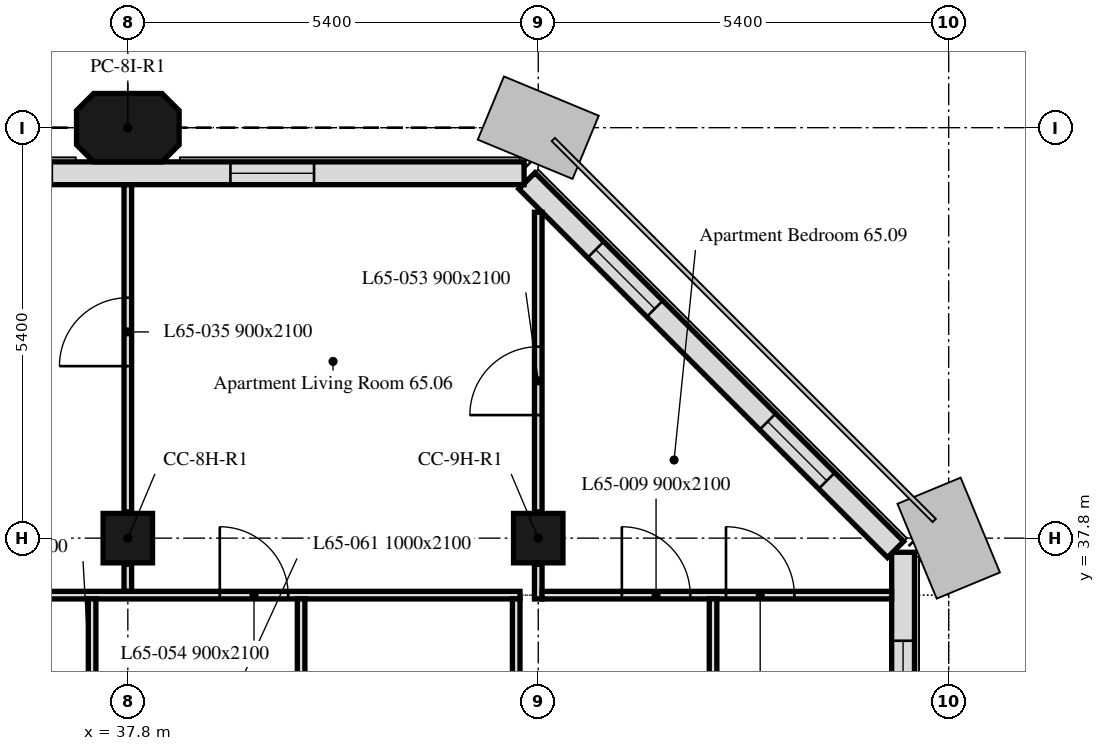
"""IFC4 building model, lengths in metres.
Left out: names, types, materials, properties, quantities, classifications, styles, units other than length and angle.
Written with IfcOpenShell. Run it as: python <this file> out.ifc"""

import sys

from ifc_helpers import new_model, si_unit, direction, frame, frame_2d, origin, origin_2d, place, context, subcontext, project, spatial, polyline, rectangle, outline, extrude, element, fill, save


model = new_model("IFC4")
c1 = context("Model", 3, precision=1e-05, world=origin(), true_north=direction((0.0, 1.0)))
c2 = subcontext(c1, "Body", "Model", "MODEL_VIEW")
j1 = project(units=[si_unit("LENGTHUNIT", "METRE"), si_unit("PLANEANGLEUNIT", "RADIAN")], contexts=[c1])
p1 = place(None, origin())
s1 = spatial("IfcSite", under=j1, at=p1, CompositionType="ELEMENT")
p2 = place(p1, origin())
s2 = spatial("IfcBuilding", under=s1, at=p2, CompositionType="ELEMENT")
p3 = place(p2, frame((0.0, 0.0, 268.6)))
s3 = spatial("IfcBuildingStorey", under=s2, at=p3, CompositionType="ELEMENT", Elevation=268.6)
for number, where, z_axis, x_axis in (
    (1, (37.8, 37.8, 0.0), (0.0, 0.0, 1.0), (1.0, 0.0, 0.0)),
    (2, (43.2, 37.8, 0.0), (0.0, 0.0, 1.0), (1.0, 0.0, 0.0)),
):
    element("IfcColumn", number, at=place(p3, frame(where, z_axis=z_axis, x_axis=x_axis)), inside=s3, PredefinedType="COLUMN", context=c2, shape_type="SweptSolid", body=[
        extrude(rectangle(XDim=0.65, YDim=0.65, at=origin_2d()), origin(), (0.0, 0.0, 1.0), 3.0),
    ])
p4 = place(p3, frame((37.8, 43.2, 0.0), z_axis=(0.0, 0.0, 1.0), x_axis=(1.0, 0.0, 0.0)))
e3 = element("IfcColumn", 3, at=p4, inside=s3, PredefinedType="COLUMN", context=c2, shape_type="SweptSolid", body=[
    extrude(outline(polyline([(-0.45, -0.45), (0.45, -0.45), (0.675, -0.225), (0.675, 0.225), (0.45, 0.45), (-0.45, 0.45), (-0.675, 0.225), (-0.675, -0.225), (-0.45, -0.45)])), origin(), (0.0, 0.0, 1.0), 3.0),
])
p5 = place(p3, frame((48.0, 5.586, 0.0), z_axis=(0.0, 0.0, 1.0), x_axis=(0.0, 1.0, 0.0)))
e4 = element("IfcWall", 4, at=p5, inside=s3, PredefinedType="SOLIDWALL", context=c2, shape_type="SweptSolid", body=[
    extrude(rectangle(XDim=32.027, YDim=0.3, at=frame_2d((16.014, 0.0))), origin(), (0.0, 0.0, 1.0), 3.0),
])
p6 = place(p5, frame((1.314, 0.0, 0.9)))
e5 = element("IfcOpeningElement", 5, at=p6, cuts=e4, PredefinedType="OPENING", context=c2, shape_type="SweptSolid", body=[
    extrude(rectangle(XDim=1.1, YDim=1.7, at=frame_2d((0.55, 0.85))), frame((0.0, 0.16, 0.0), z_axis=(0.0, -1.0, 0.0), x_axis=(1.0, 0.0, 0.0)), (0.0, 0.0, 1.0), 0.32),
])
p7 = place(p5, frame((2.764, 0.0, 0.9)))
e6 = element("IfcOpeningElement", 6, at=p7, cuts=e4, PredefinedType="OPENING", context=c2, shape_type="SweptSolid", body=[
    extrude(rectangle(XDim=1.1, YDim=1.7, at=frame_2d((0.55, 0.85))), frame((0.0, 0.16, 0.0), z_axis=(0.0, -1.0, 0.0), x_axis=(1.0, 0.0, 0.0)), (0.0, 0.0, 1.0), 0.32),
])
p8 = place(p5, frame((6.564, 0.0, 0.9)))
e7 = element("IfcOpeningElement", 7, at=p8, cuts=e4, PredefinedType="OPENING", context=c2, shape_type="SweptSolid", body=[
    extrude(rectangle(XDim=1.1, YDim=1.7, at=frame_2d((0.55, 0.85))), frame((0.0, 0.16, 0.0), z_axis=(0.0, -1.0, 0.0), x_axis=(1.0, 0.0, 0.0)), (0.0, 0.0, 1.0), 0.32),
])
p9 = place(p5, frame((8.514, 0.0, 0.9)))
e8 = element("IfcOpeningElement", 8, at=p9, cuts=e4, PredefinedType="OPENING", context=c2, shape_type="SweptSolid", body=[
    extrude(rectangle(XDim=1.1, YDim=1.7, at=frame_2d((0.55, 0.85))), frame((0.0, 0.16, 0.0), z_axis=(0.0, -1.0, 0.0), x_axis=(1.0, 0.0, 0.0)), (0.0, 0.0, 1.0), 0.32),
])
p10 = place(p5, frame((11.964, 0.0, 0.9)))
e9 = element("IfcOpeningElement", 9, at=p10, cuts=e4, PredefinedType="OPENING", context=c2, shape_type="SweptSolid", body=[
    extrude(rectangle(XDim=1.1, YDim=1.7, at=frame_2d((0.55, 0.85))), frame((0.0, 0.16, 0.0), z_axis=(0.0, -1.0, 0.0), x_axis=(1.0, 0.0, 0.0)), (0.0, 0.0, 1.0), 0.32),
])
p11 = place(p5, frame((13.564, 0.0, 0.9)))
e10 = element("IfcOpeningElement", 10, at=p11, cuts=e4, PredefinedType="OPENING", context=c2, shape_type="SweptSolid", body=[
    extrude(rectangle(XDim=1.1, YDim=1.7, at=frame_2d((0.55, 0.85))), frame((0.0, 0.16, 0.0), z_axis=(0.0, -1.0, 0.0), x_axis=(1.0, 0.0, 0.0)), (0.0, 0.0, 1.0), 0.32),
])
p12 = place(p5, frame((17.014, 0.0, 0.9)))
e11 = element("IfcOpeningElement", 11, at=p12, cuts=e4, PredefinedType="OPENING", context=c2, shape_type="SweptSolid", body=[
    extrude(rectangle(XDim=3.4, YDim=1.7, at=frame_2d((1.7, 0.85))), frame((0.0, 0.16, 0.0), z_axis=(0.0, -1.0, 0.0), x_axis=(1.0, 0.0, 0.0)), (0.0, 0.0, 1.0), 0.32),
])
p13 = place(p5, frame((22.764, 0.0, 0.9)))
e12 = element("IfcOpeningElement", 12, at=p13, cuts=e4, PredefinedType="OPENING", context=c2, shape_type="SweptSolid", body=[
    extrude(rectangle(XDim=1.1, YDim=1.7, at=frame_2d((0.55, 0.85))), frame((0.0, 0.16, 0.0), z_axis=(0.0, -1.0, 0.0), x_axis=(1.0, 0.0, 0.0)), (0.0, 0.0, 1.0), 0.32),
])
p14 = place(p5, frame((24.364, 0.0, 0.9)))
e13 = element("IfcOpeningElement", 13, at=p14, cuts=e4, PredefinedType="OPENING", context=c2, shape_type="SweptSolid", body=[
    extrude(rectangle(XDim=1.1, YDim=1.7, at=frame_2d((0.55, 0.85))), frame((0.0, 0.16, 0.0), z_axis=(0.0, -1.0, 0.0), x_axis=(1.0, 0.0, 0.0)), (0.0, 0.0, 1.0), 0.32),
])
p15 = place(p5, frame((28.239, 0.0, 0.9)))
e14 = element("IfcOpeningElement", 14, at=p15, cuts=e4, PredefinedType="OPENING", context=c2, shape_type="SweptSolid", body=[
    extrude(rectangle(XDim=0.65, YDim=1.7, at=frame_2d((0.325, 0.85))), frame((0.0, 0.16, 0.0), z_axis=(0.0, -1.0, 0.0), x_axis=(1.0, 0.0, 0.0)), (0.0, 0.0, 1.0), 0.32),
])
p16 = place(p5, frame((29.764, 0.0, 0.9)))
e15 = element("IfcOpeningElement", 15, at=p16, cuts=e4, PredefinedType="OPENING", context=c2, shape_type="SweptSolid", body=[
    extrude(rectangle(XDim=1.1, YDim=1.7, at=frame_2d((0.55, 0.85))), frame((0.0, 0.16, 0.0), z_axis=(0.0, -1.0, 0.0), x_axis=(1.0, 0.0, 0.0)), (0.0, 0.0, 1.0), 0.32),
])
p17 = place(p3, frame((47.901, 37.65, 0.0), z_axis=(0.0, 0.0, 1.0), x_axis=(-0.707106781187, 0.707106781187, 0.0)))
e16 = element("IfcWall", 16, at=p17, inside=s3, PredefinedType="SOLIDWALL", context=c2, shape_type="SweptSolid", body=[
    extrude(rectangle(XDim=6.86, YDim=0.3, at=frame_2d((3.43, 0.0))), origin(), (0.0, 0.0, 1.0), 3.0),
])
p18 = place(p17, frame((1.28, 0.0, 0.9)))
e17 = element("IfcOpeningElement", 17, at=p18, cuts=e16, PredefinedType="OPENING", context=c2, shape_type="SweptSolid", body=[
    extrude(rectangle(XDim=1.1, YDim=1.7, at=frame_2d((0.55, 0.85))), frame((0.0, 0.16, 0.0), z_axis=(0.0, -1.0, 0.0), x_axis=(1.0, 0.0, 0.0)), (0.0, 0.0, 1.0), 0.32),
])
p19 = place(p17, frame((4.48, 0.0, 0.9)))
e18 = element("IfcOpeningElement", 18, at=p19, cuts=e16, PredefinedType="OPENING", context=c2, shape_type="SweptSolid", body=[
    extrude(rectangle(XDim=1.1, YDim=1.7, at=frame_2d((0.55, 0.85))), frame((0.0, 0.16, 0.0), z_axis=(0.0, -1.0, 0.0), x_axis=(1.0, 0.0, 0.0)), (0.0, 0.0, 1.0), 0.32),
])
p20 = place(p3, frame((43.014, 42.6, 0.0), z_axis=(0.0, 0.0, 1.0), x_axis=(-1.0, 0.0, 0.0)))
e19 = element("IfcWall", 19, at=p20, inside=s3, PredefinedType="SOLIDWALL", context=c2, shape_type="SweptSolid", body=[
    extrude(rectangle(XDim=32.027, YDim=0.3, at=frame_2d((16.014, 0.0))), origin(), (0.0, 0.0, 1.0), 3.0),
])
p21 = place(p20, frame((2.764, 0.0, 0.9)))
e20 = element("IfcOpeningElement", 20, at=p21, cuts=e19, PredefinedType="OPENING", context=c2, shape_type="SweptSolid", body=[
    extrude(rectangle(XDim=1.1, YDim=1.7, at=frame_2d((0.55, 0.85))), frame((0.0, 0.16, 0.0), z_axis=(0.0, -1.0, 0.0), x_axis=(1.0, 0.0, 0.0)), (0.0, 0.0, 1.0), 0.32),
])
p22 = place(p20, frame((6.214, 0.0, 0.9)))
e21 = element("IfcOpeningElement", 21, at=p22, cuts=e19, PredefinedType="OPENING", context=c2, shape_type="SweptSolid", body=[
    extrude(rectangle(XDim=3.4, YDim=1.7, at=frame_2d((1.7, 0.85))), frame((0.0, 0.16, 0.0), z_axis=(0.0, -1.0, 0.0), x_axis=(1.0, 0.0, 0.0)), (0.0, 0.0, 1.0), 0.32),
])
p23 = place(p20, frame((13.564, 0.0, 0.9)))
e22 = element("IfcOpeningElement", 22, at=p23, cuts=e19, PredefinedType="OPENING", context=c2, shape_type="SweptSolid", body=[
    extrude(rectangle(XDim=1.1, YDim=1.7, at=frame_2d((0.55, 0.85))), frame((0.0, 0.16, 0.0), z_axis=(0.0, -1.0, 0.0), x_axis=(1.0, 0.0, 0.0)), (0.0, 0.0, 1.0), 0.32),
])
p24 = place(p20, frame((17.014, 0.0, 0.9)))
e23 = element("IfcOpeningElement", 23, at=p24, cuts=e19, PredefinedType="OPENING", context=c2, shape_type="SweptSolid", body=[
    extrude(rectangle(XDim=3.4, YDim=1.7, at=frame_2d((1.7, 0.85))), frame((0.0, 0.16, 0.0), z_axis=(0.0, -1.0, 0.0), x_axis=(1.0, 0.0, 0.0)), (0.0, 0.0, 1.0), 0.32),
])
p25 = place(p20, frame((24.364, 0.0, 0.9)))
e24 = element("IfcOpeningElement", 24, at=p25, cuts=e19, PredefinedType="OPENING", context=c2, shape_type="SweptSolid", body=[
    extrude(rectangle(XDim=1.1, YDim=1.7, at=frame_2d((0.55, 0.85))), frame((0.0, 0.16, 0.0), z_axis=(0.0, -1.0, 0.0), x_axis=(1.0, 0.0, 0.0)), (0.0, 0.0, 1.0), 0.32),
])
p26 = place(p20, frame((27.814, 0.0, 0.9)))
e25 = element("IfcOpeningElement", 25, at=p26, cuts=e19, PredefinedType="OPENING", context=c2, shape_type="SweptSolid", body=[
    extrude(rectangle(XDim=3.4, YDim=1.7, at=frame_2d((1.7, 0.85))), frame((0.0, 0.16, 0.0), z_axis=(0.0, -1.0, 0.0), x_axis=(1.0, 0.0, 0.0)), (0.0, 0.0, 1.0), 0.32),
])
p27 = place(p3, frame((37.8, 37.1, 0.0), z_axis=(0.0, 0.0, 1.0), x_axis=(0.0, 1.0, 0.0)))
e26 = element("IfcWall", 26, at=p27, inside=s3, PredefinedType="PARTITIONING", context=c2, shape_type="SweptSolid", body=[
    extrude(rectangle(XDim=0.355, YDim=0.1, at=frame_2d((0.177, 0.0))), origin(), (0.0, 0.0, 1.0), 3.0),
])
p28 = place(p3, frame((37.8, 38.145, 0.0), z_axis=(0.0, 0.0, 1.0), x_axis=(0.0, 1.0, 0.0)))
e27 = element("IfcWall", 27, at=p28, inside=s3, PredefinedType="PARTITIONING", context=c2, shape_type="SweptSolid", body=[
    extrude(rectangle(XDim=4.304, YDim=0.1, at=frame_2d((2.152, 0.0))), origin(), (0.0, 0.0, 1.0), 3.0),
])
p29 = place(p28, frame((1.918, 0.0, 0.0)))
e28 = element("IfcOpeningElement", 28, at=p29, cuts=e27, PredefinedType="OPENING", context=c2, shape_type="SweptSolid", body=[
    extrude(rectangle(XDim=0.9, YDim=2.1, at=frame_2d((0.45, 1.05))), frame((0.0, 0.05, 0.0), z_axis=(0.0, -1.0, 0.0), x_axis=(1.0, 0.0, 0.0)), (0.0, 0.0, 1.0), 0.1),
])
p30 = place(p3, frame((32.475, 37.05, 0.0), z_axis=(0.0, 0.0, 1.0), x_axis=(1.0, 0.0, 0.0)))
e29 = element("IfcWall", 29, at=p30, inside=s3, PredefinedType="PARTITIONING", context=c2, shape_type="SweptSolid", body=[
    extrude(rectangle(XDim=10.485, YDim=0.1, at=frame_2d((5.242, 0.0))), origin(), (0.0, 0.0, 1.0), 3.0),
])
p31 = place(p30, frame((1.275, 0.0, 0.0)))
e30 = element("IfcOpeningElement", 30, at=p31, cuts=e29, PredefinedType="OPENING", context=c2, shape_type="SweptSolid", body=[
    extrude(rectangle(XDim=0.9, YDim=2.1, at=frame_2d((0.45, 1.05))), frame((0.0, 0.05, 0.0), z_axis=(0.0, -1.0, 0.0), x_axis=(1.0, 0.0, 0.0)), (0.0, 0.0, 1.0), 0.1),
])
p32 = place(p30, frame((6.535, 0.0, 0.0)))
e31 = element("IfcOpeningElement", 31, at=p32, cuts=e29, PredefinedType="OPENING", context=c2, shape_type="SweptSolid", body=[
    extrude(rectangle(XDim=0.9, YDim=2.1, at=frame_2d((0.45, 1.05))), frame((0.0, 0.05, 0.0), z_axis=(0.0, -1.0, 0.0), x_axis=(1.0, 0.0, 0.0)), (0.0, 0.0, 1.0), 0.1),
])
p33 = place(p3, frame((43.2, 37.0, 0.0), z_axis=(0.0, 0.0, 1.0), x_axis=(0.0, 1.0, 0.0)))
e32 = element("IfcWall", 32, at=p33, inside=s3, PredefinedType="PARTITIONING", context=c2, shape_type="SweptSolid", body=[
    extrude(rectangle(XDim=0.455, YDim=0.1, at=frame_2d((0.228, 0.0))), origin(), (0.0, 0.0, 1.0), 3.0),
])
p34 = place(p3, frame((43.2, 38.145, 0.0), z_axis=(0.0, 0.0, 1.0), x_axis=(0.0, 1.0, 0.0)))
e33 = element("IfcWall", 33, at=p34, inside=s3, PredefinedType="PARTITIONING", context=c2, shape_type="SweptSolid", body=[
    extrude(rectangle(XDim=3.943, YDim=0.1, at=frame_2d((1.971, 0.0))), origin(), (0.0, 0.0, 1.0), 3.0),
])
p35 = place(p34, frame((1.274, 0.0, 0.0)))
e34 = element("IfcOpeningElement", 34, at=p35, cuts=e33, PredefinedType="OPENING", context=c2, shape_type="SweptSolid", body=[
    extrude(rectangle(XDim=0.9, YDim=2.1, at=frame_2d((0.45, 1.05))), frame((0.0, 0.05, 0.0), z_axis=(0.0, -1.0, 0.0), x_axis=(1.0, 0.0, 0.0)), (0.0, 0.0, 1.0), 0.1),
])
p36 = place(p3, frame((43.25, 37.05, 0.0), z_axis=(0.0, 0.0, 1.0), x_axis=(1.0, 0.0, 0.0)))
e35 = element("IfcWall", 35, at=p36, inside=s3, PredefinedType="PARTITIONING", context=c2, shape_type="SweptSolid", body=[
    extrude(rectangle(XDim=4.599, YDim=0.1, at=frame_2d((2.3, 0.0))), origin(), (0.0, 0.0, 1.0), 3.0),
])
p37 = place(p36, frame((1.05, 0.0, 0.0)))
e36 = element("IfcOpeningElement", 36, at=p37, cuts=e35, PredefinedType="OPENING", context=c2, shape_type="SweptSolid", body=[
    extrude(rectangle(XDim=0.9, YDim=2.1, at=frame_2d((0.45, 1.05))), frame((0.0, 0.05, 0.0), z_axis=(0.0, -1.0, 0.0), x_axis=(1.0, 0.0, 0.0)), (0.0, 0.0, 1.0), 0.1),
])
p38 = place(p36, frame((2.42, 0.0, 0.0)))
e37 = element("IfcOpeningElement", 37, at=p38, cuts=e35, PredefinedType="OPENING", context=c2, shape_type="SweptSolid", body=[
    extrude(rectangle(XDim=0.9, YDim=2.1, at=frame_2d((0.45, 1.05))), frame((0.0, 0.05, 0.0), z_axis=(0.0, -1.0, 0.0), x_axis=(1.0, 0.0, 0.0)), (0.0, 0.0, 1.0), 0.1),
])
p39 = place(p3, frame((37.33, 34.725, 0.0), z_axis=(0.0, 0.0, 1.0), x_axis=(0.0, 1.0, 0.0)))
e38 = element("IfcWall", 38, at=p39, inside=s3, PredefinedType="PARTITIONING", context=c2, shape_type="SweptSolid", body=[
    extrude(rectangle(XDim=2.275, YDim=0.1, at=frame_2d((1.137, 0.0))), origin(), (0.0, 0.0, 1.0), 3.0),
])
p40 = place(p39, frame((0.25, 0.0, 0.0)))
e39 = element("IfcOpeningElement", 39, at=p40, cuts=e38, PredefinedType="OPENING", context=c2, shape_type="SweptSolid", body=[
    extrude(rectangle(XDim=0.9, YDim=2.1, at=frame_2d((0.45, 1.05))), frame((0.0, 0.05, 0.0), z_axis=(0.0, -1.0, 0.0), x_axis=(1.0, 0.0, 0.0)), (0.0, 0.0, 1.0), 0.1),
])
p41 = place(p3, frame((40.08, 34.725, 0.0), z_axis=(0.0, 0.0, 1.0), x_axis=(0.0, 1.0, 0.0)))
e40 = element("IfcWall", 40, at=p41, inside=s3, PredefinedType="PARTITIONING", context=c2, shape_type="SweptSolid", body=[
    extrude(rectangle(XDim=2.275, YDim=0.1, at=frame_2d((1.137, 0.0))), origin(), (0.0, 0.0, 1.0), 3.0),
])
p42 = place(p41, frame((0.25, 0.0, 0.0)))
e41 = element("IfcOpeningElement", 41, at=p42, cuts=e40, PredefinedType="OPENING", context=c2, shape_type="SweptSolid", body=[
    extrude(rectangle(XDim=0.9, YDim=2.1, at=frame_2d((0.45, 1.05))), frame((0.0, 0.05, 0.0), z_axis=(0.0, -1.0, 0.0), x_axis=(1.0, 0.0, 0.0)), (0.0, 0.0, 1.0), 0.1),
])
for number, where, z_axis, x_axis in (
    (42, (42.91, 34.725, 0.0), (0.0, 0.0, 1.0), (0.0, 1.0, 0.0)),
    (43, (45.5, 34.725, 0.0), (0.0, 0.0, 1.0), (0.0, 1.0, 0.0)),
):
    element("IfcWall", number, at=place(p3, frame(where, z_axis=z_axis, x_axis=x_axis)), inside=s3, PredefinedType="PARTITIONING", context=c2, shape_type="SweptSolid", body=[
        extrude(rectangle(XDim=2.275, YDim=0.1, at=frame_2d((1.137, 0.0))), origin(), (0.0, 0.0, 1.0), 3.0),
    ])
p43 = place(p16, origin())
e44 = element("IfcWindow", 44, at=p43, inside=s3, PartitioningType="SINGLE_PANEL", PredefinedType="WINDOW", context=c2, shape_type="SweptSolid", body=[
    extrude(rectangle(XDim=1.1, YDim=1.7, at=frame_2d((0.55, 0.85))), frame((0.0, 0.03, 0.0), z_axis=(0.0, -1.0, 0.0), x_axis=(1.0, 0.0, 0.0)), (0.0, 0.0, 1.0), 0.06),
])
fill(e15, e44)
p44 = place(p18, origin())
e45 = element("IfcWindow", 45, at=p44, inside=s3, PartitioningType="SINGLE_PANEL", PredefinedType="WINDOW", context=c2, shape_type="SweptSolid", body=[
    extrude(rectangle(XDim=1.1, YDim=1.7, at=frame_2d((0.55, 0.85))), frame((0.0, 0.03, 0.0), z_axis=(0.0, -1.0, 0.0), x_axis=(1.0, 0.0, 0.0)), (0.0, 0.0, 1.0), 0.06),
])
fill(e17, e45)
p45 = place(p19, origin())
e46 = element("IfcWindow", 46, at=p45, inside=s3, PartitioningType="SINGLE_PANEL", PredefinedType="WINDOW", context=c2, shape_type="SweptSolid", body=[
    extrude(rectangle(XDim=1.1, YDim=1.7, at=frame_2d((0.55, 0.85))), frame((0.0, 0.03, 0.0), z_axis=(0.0, -1.0, 0.0), x_axis=(1.0, 0.0, 0.0)), (0.0, 0.0, 1.0), 0.06),
])
fill(e18, e46)
p46 = place(p21, origin())
e47 = element("IfcWindow", 47, at=p46, inside=s3, PartitioningType="SINGLE_PANEL", PredefinedType="WINDOW", context=c2, shape_type="SweptSolid", body=[
    extrude(rectangle(XDim=1.1, YDim=1.7, at=frame_2d((0.55, 0.85))), frame((0.0, 0.03, 0.0), z_axis=(0.0, -1.0, 0.0), x_axis=(1.0, 0.0, 0.0)), (0.0, 0.0, 1.0), 0.06),
])
fill(e20, e47)
p47 = place(p37, origin())
e48 = element("IfcDoor", 48, at=p47, inside=s3, OperationType="SINGLE_SWING_RIGHT", PredefinedType="DOOR", context=c2, shape_type="SweptSolid", body=[
    extrude(rectangle(XDim=0.9, YDim=2.1, at=frame_2d((0.45, 1.05))), frame((0.0, 0.025, 0.0), z_axis=(0.0, -1.0, 0.0), x_axis=(1.0, 0.0, 0.0)), (0.0, 0.0, 1.0), 0.05),
])
fill(e36, e48)
p48 = place(p38, origin())
e49 = element("IfcDoor", 49, at=p48, inside=s3, OperationType="SINGLE_SWING_LEFT", PredefinedType="DOOR", context=c2, shape_type="SweptSolid", body=[
    extrude(rectangle(XDim=0.9, YDim=2.1, at=frame_2d((0.45, 1.05))), frame((0.0, 0.025, 0.0), z_axis=(0.0, -1.0, 0.0), x_axis=(1.0, 0.0, 0.0)), (0.0, 0.0, 1.0), 0.05),
])
fill(e37, e49)
p49 = place(p29, origin())
e50 = element("IfcDoor", 50, at=p49, inside=s3, OperationType="SINGLE_SWING_LEFT", PredefinedType="DOOR", context=c2, shape_type="SweptSolid", body=[
    extrude(rectangle(XDim=0.9, YDim=2.1, at=frame_2d((0.45, 1.05))), frame((0.0, 0.025, 0.0), z_axis=(0.0, -1.0, 0.0), x_axis=(1.0, 0.0, 0.0)), (0.0, 0.0, 1.0), 0.05),
])
fill(e28, e50)
p50 = place(p35, origin())
e51 = element("IfcDoor", 51, at=p50, inside=s3, OperationType="SINGLE_SWING_RIGHT", PredefinedType="DOOR", context=c2, shape_type="SweptSolid", body=[
    extrude(rectangle(XDim=0.9, YDim=2.1, at=frame_2d((0.45, 1.05))), frame((0.0, 0.025, 0.0), z_axis=(0.0, -1.0, 0.0), x_axis=(1.0, 0.0, 0.0)), (0.0, 0.0, 1.0), 0.05),
])
fill(e34, e51)
p51 = place(p32, origin())
e52 = element("IfcDoor", 52, at=p51, inside=s3, OperationType="SINGLE_SWING_LEFT", PredefinedType="DOOR", context=c2, shape_type="SweptSolid", body=[
    extrude(rectangle(XDim=0.9, YDim=2.1, at=frame_2d((0.45, 1.05))), frame((0.0, 0.025, 0.0), z_axis=(0.0, -1.0, 0.0), x_axis=(1.0, 0.0, 0.0)), (0.0, 0.0, 1.0), 0.05),
])
fill(e31, e52)
save(model, sys.argv[1])
